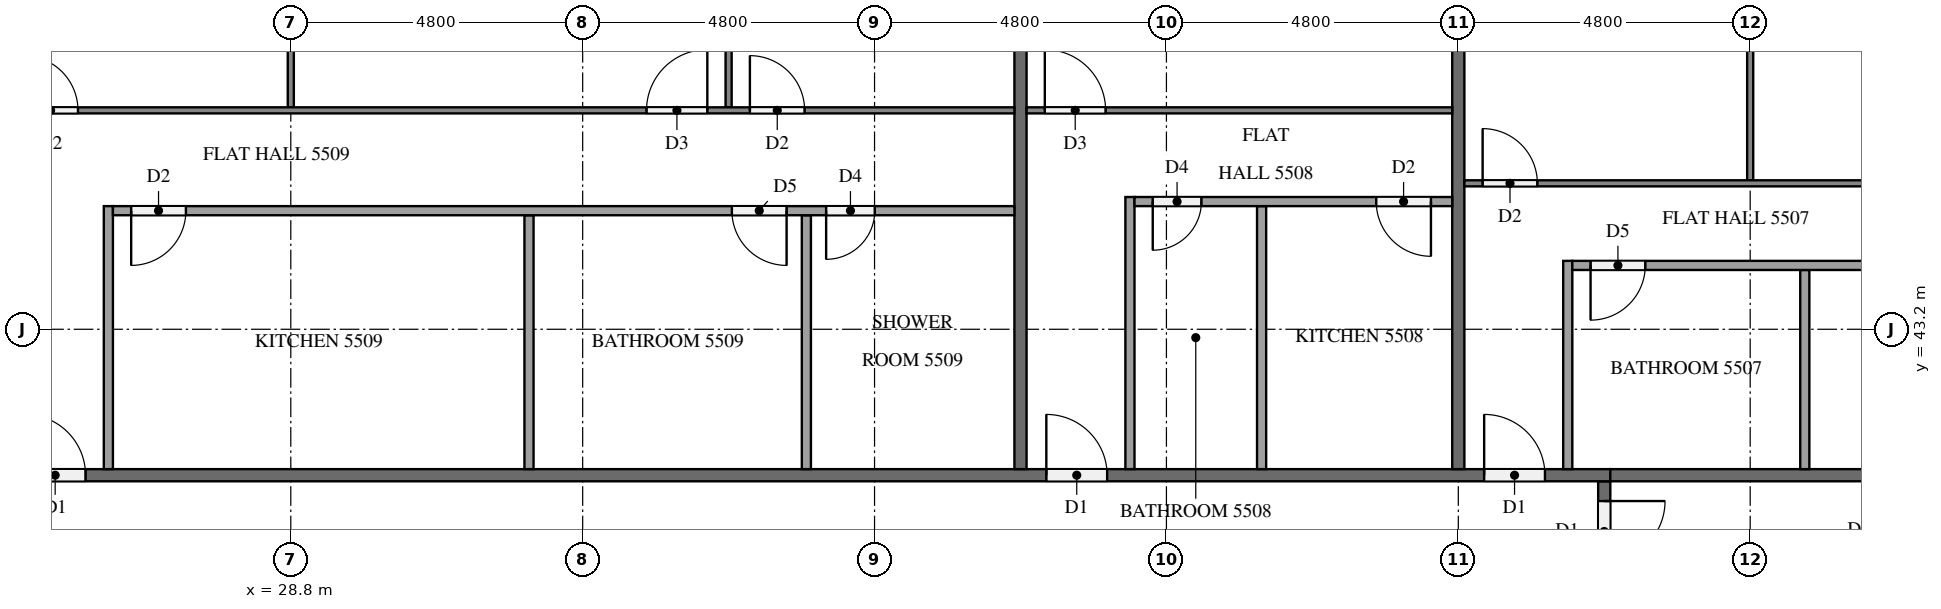
"""IFC4 building model, lengths in metres.
Left out: names, types, materials, properties, quantities, classifications, styles, units other than length and angle.
Written with IfcOpenShell. Run it as: python <this file> out.ifc"""

import sys

from ifc_helpers import new_model, si_unit, direction, frame, frame_2d, origin, place, context, subcontext, project, spatial, rectangle, extrude, element, fill, save


model = new_model("IFC4")
c1 = context("Model", 3, precision=1e-05, world=origin(), true_north=direction((0.0, 1.0)))
c2 = subcontext(c1, "Body", "Model", "MODEL_VIEW")
j1 = project(units=[si_unit("LENGTHUNIT", "METRE"), si_unit("PLANEANGLEUNIT", "RADIAN")], contexts=[c1])
p1 = place(None, origin())
s1 = spatial("IfcSite", under=j1, at=p1, CompositionType="ELEMENT")
p2 = place(p1, origin())
s2 = spatial("IfcBuilding", under=s1, at=p2, CompositionType="ELEMENT")
p3 = place(p2, frame((0.0, 0.0, 212.3)))
s3 = spatial("IfcBuildingStorey", under=s2, at=p3, CompositionType="ELEMENT", Elevation=212.3)
p4 = place(p3, frame((50.4, 40.7, 0.0), z_axis=(0.0, 0.0, 1.0), x_axis=(0.0, -1.0, 0.0)))
e1 = element("IfcWall", 1, at=p4, inside=s3, PredefinedType="PARTITIONING", context=c2, shape_type="SweptSolid", body=[
    extrude(rectangle(XDim=28.6, YDim=0.2, at=frame_2d((14.3, 0.0))), origin(), (0.0, 0.0, 1.0), 3.2),
])
p5 = place(p4, frame((19.525, 0.0, 0.0)))
e2 = element("IfcOpeningElement", 2, at=p5, cuts=e1, PredefinedType="OPENING", context=c2, shape_type="SweptSolid", body=[
    extrude(rectangle(XDim=1.0, YDim=2.1, at=frame_2d((0.5, 1.05))), frame((0.0, 0.11, 0.0), z_axis=(0.0, -1.0, 0.0), x_axis=(1.0, 0.0, 0.0)), (0.0, 0.0, 1.0), 0.22),
])
p6 = place(p4, frame((7.525, 0.0, 0.0)))
e3 = element("IfcOpeningElement", 3, at=p6, cuts=e1, PredefinedType="OPENING", context=c2, shape_type="SweptSolid", body=[
    extrude(rectangle(XDim=1.0, YDim=2.1, at=frame_2d((0.5, 1.05))), frame((0.0, 0.11, 0.0), z_axis=(0.0, -1.0, 0.0), x_axis=(1.0, 0.0, 0.0)), (0.0, 0.0, 1.0), 0.22),
])
p7 = place(p4, frame((0.325, 0.0, 0.0)))
e4 = element("IfcOpeningElement", 4, at=p7, cuts=e1, PredefinedType="OPENING", context=c2, shape_type="SweptSolid", body=[
    extrude(rectangle(XDim=1.0, YDim=2.1, at=frame_2d((0.5, 1.05))), frame((0.0, 0.11, 0.0), z_axis=(0.0, -1.0, 0.0), x_axis=(1.0, 0.0, 0.0)), (0.0, 0.0, 1.0), 0.22),
])
p8 = place(p3, frame((11.9, 40.8, 0.0), z_axis=(0.0, 0.0, 1.0), x_axis=(1.0, 0.0, 0.0)))
e5 = element("IfcWall", 5, at=p8, inside=s3, PredefinedType="PARTITIONING", context=c2, shape_type="SweptSolid", body=[
    extrude(rectangle(XDim=38.6, YDim=0.2, at=frame_2d((19.3, 0.0))), origin(), (0.0, 0.0, 1.0), 3.2),
])
p9 = place(p8, frame((36.525, 0.0, 0.0)))
e6 = element("IfcOpeningElement", 6, at=p9, cuts=e5, PredefinedType="OPENING", context=c2, shape_type="SweptSolid", body=[
    extrude(rectangle(XDim=1.0, YDim=2.1, at=frame_2d((0.5, 1.05))), frame((0.0, 0.11, 0.0), z_axis=(0.0, -1.0, 0.0), x_axis=(1.0, 0.0, 0.0)), (0.0, 0.0, 1.0), 0.22),
])
p10 = place(p8, frame((29.325, 0.0, 0.0)))
e7 = element("IfcOpeningElement", 7, at=p10, cuts=e5, PredefinedType="OPENING", context=c2, shape_type="SweptSolid", body=[
    extrude(rectangle(XDim=1.0, YDim=2.1, at=frame_2d((0.5, 1.05))), frame((0.0, 0.11, 0.0), z_axis=(0.0, -1.0, 0.0), x_axis=(1.0, 0.0, 0.0)), (0.0, 0.0, 1.0), 0.22),
])
p11 = place(p8, frame((12.525, 0.0, 0.0)))
e8 = element("IfcOpeningElement", 8, at=p11, cuts=e5, PredefinedType="OPENING", context=c2, shape_type="SweptSolid", body=[
    extrude(rectangle(XDim=1.0, YDim=2.1, at=frame_2d((0.5, 1.05))), frame((0.0, 0.11, 0.0), z_axis=(0.0, -1.0, 0.0), x_axis=(1.0, 0.0, 0.0)), (0.0, 0.0, 1.0), 0.22),
])
p12 = place(p8, frame((10.625, 0.0, 0.0)))
e9 = element("IfcOpeningElement", 9, at=p12, cuts=e5, PredefinedType="OPENING", context=c2, shape_type="SweptSolid", body=[
    extrude(rectangle(XDim=1.1, YDim=2.1, at=frame_2d((0.55, 1.05))), frame((0.0, 0.11, 0.0), z_axis=(0.0, -1.0, 0.0), x_axis=(1.0, 0.0, 0.0)), (0.0, 0.0, 1.0), 0.22),
])
p13 = place(p3, frame((50.5, 40.8, 0.0), z_axis=(0.0, 0.0, 1.0), x_axis=(1.0, 0.0, 0.0)))
e10 = element("IfcWall", 10, at=p13, inside=s3, PredefinedType="PARTITIONING", context=c2, shape_type="SweptSolid", body=[
    extrude(rectangle(XDim=11.8, YDim=0.2, at=frame_2d((5.9, 0.0))), origin(), (0.0, 0.0, 1.0), 3.2),
])
p14 = place(p3, frame((48.0, 52.475, 0.0), z_axis=(0.0, 0.0, 1.0), x_axis=(0.0, -1.0, 0.0)))
e11 = element("IfcWall", 11, at=p14, inside=s3, PredefinedType="PARTITIONING", context=c2, shape_type="SweptSolid", body=[
    extrude(rectangle(XDim=11.575, YDim=0.2, at=frame_2d((5.788, 0.0))), origin(), (0.0, 0.0, 1.0), 3.2),
])
p15 = place(p3, frame((40.8, 52.7, 0.0), z_axis=(0.0, 0.0, 1.0), x_axis=(0.0, -1.0, 0.0)))
e12 = element("IfcWall", 12, at=p15, inside=s3, PredefinedType="PARTITIONING", context=c2, shape_type="SweptSolid", body=[
    extrude(rectangle(XDim=11.8, YDim=0.2, at=frame_2d((5.9, 0.0))), origin(), (0.0, 0.0, 1.0), 3.2),
])
p16 = place(p3, frame((52.8, 45.65, 0.0), z_axis=(0.0, 0.0, 1.0), x_axis=(0.0, 1.0, 0.0)))
e13 = element("IfcWall", 13, at=p16, inside=s3, PredefinedType="PARTITIONING", context=c2, shape_type="SweptSolid", body=[
    extrude(rectangle(XDim=7.05, YDim=0.1, at=frame_2d((3.525, 0.0))), origin(), (0.0, 0.0, 1.0), 3.2),
])
p17 = place(p3, frame((48.1, 45.6, 0.0), z_axis=(0.0, 0.0, 1.0), x_axis=(1.0, 0.0, 0.0)))
e14 = element("IfcWall", 14, at=p17, inside=s3, PredefinedType="PARTITIONING", context=c2, shape_type="SweptSolid", body=[
    extrude(rectangle(XDim=14.2, YDim=0.1, at=frame_2d((7.1, 0.0))), origin(), (0.0, 0.0, 1.0), 3.2),
])
p18 = place(p17, frame((0.3, 0.0, 0.0)))
e15 = element("IfcOpeningElement", 15, at=p18, cuts=e14, PredefinedType="OPENING", context=c2, shape_type="SweptSolid", body=[
    extrude(rectangle(XDim=0.9, YDim=2.1, at=frame_2d((0.45, 1.05))), frame((0.0, 0.06, 0.0), z_axis=(0.0, -1.0, 0.0), x_axis=(1.0, 0.0, 0.0)), (0.0, 0.0, 1.0), 0.12),
])
p19 = place(p17, frame((8.25, 0.0, 0.0)))
e16 = element("IfcOpeningElement", 16, at=p19, cuts=e14, PredefinedType="OPENING", context=c2, shape_type="SweptSolid", body=[
    extrude(rectangle(XDim=0.9, YDim=2.1, at=frame_2d((0.45, 1.05))), frame((0.0, 0.06, 0.0), z_axis=(0.0, -1.0, 0.0), x_axis=(1.0, 0.0, 0.0)), (0.0, 0.0, 1.0), 0.12),
])
p20 = place(p17, frame((9.85, 0.0, 0.0)))
e17 = element("IfcOpeningElement", 17, at=p20, cuts=e14, PredefinedType="OPENING", context=c2, shape_type="SweptSolid", body=[
    extrude(rectangle(XDim=1.0, YDim=2.1, at=frame_2d((0.5, 1.05))), frame((0.0, 0.06, 0.0), z_axis=(0.0, -1.0, 0.0), x_axis=(1.0, 0.0, 0.0)), (0.0, 0.0, 1.0), 0.12),
])
p21 = place(p3, frame((53.698, 40.9, 0.0), z_axis=(0.0, 0.0, 1.0), x_axis=(0.0, 1.0, 0.0)))
e18 = element("IfcWall", 18, at=p21, inside=s3, PredefinedType="PARTITIONING", context=c2, shape_type="SweptSolid", body=[
    extrude(rectangle(XDim=3.275, YDim=0.15, at=frame_2d((1.638, 0.0))), origin(), (0.0, 0.0, 1.0), 3.2),
])
p22 = place(p3, frame((49.8, 40.9, 0.0), z_axis=(0.0, 0.0, 1.0), x_axis=(0.0, 1.0, 0.0)))
e19 = element("IfcWall", 19, at=p22, inside=s3, PredefinedType="PARTITIONING", context=c2, shape_type="SweptSolid", body=[
    extrude(rectangle(XDim=3.425, YDim=0.15, at=frame_2d((1.712, 0.0))), origin(), (0.0, 0.0, 1.0), 3.2),
])
p23 = place(p3, frame((62.3, 44.25, 0.0), z_axis=(0.0, 0.0, 1.0), x_axis=(-1.0, 0.0, 0.0)))
e20 = element("IfcWall", 20, at=p23, inside=s3, PredefinedType="PARTITIONING", context=c2, shape_type="SweptSolid", body=[
    extrude(rectangle(XDim=12.425, YDim=0.15, at=frame_2d((6.212, 0.0))), origin(), (0.0, 0.0, 1.0), 3.2),
])
p24 = place(p23, frame((11.225, 0.0, 0.0)))
e21 = element("IfcOpeningElement", 21, at=p24, cuts=e20, PredefinedType="OPENING", context=c2, shape_type="SweptSolid", body=[
    extrude(rectangle(XDim=0.9, YDim=2.1, at=frame_2d((0.45, 1.05))), frame((0.0, 0.085, 0.0), z_axis=(0.0, -1.0, 0.0), x_axis=(1.0, 0.0, 0.0)), (0.0, 0.0, 1.0), 0.17),
])
p25 = place(p23, frame((3.192, 0.0, 0.0)))
e22 = element("IfcOpeningElement", 22, at=p25, cuts=e20, PredefinedType="OPENING", context=c2, shape_type="SweptSolid", body=[
    extrude(rectangle(XDim=0.9, YDim=2.1, at=frame_2d((0.45, 1.05))), frame((0.0, 0.085, 0.0), z_axis=(0.0, -1.0, 0.0), x_axis=(1.0, 0.0, 0.0)), (0.0, 0.0, 1.0), 0.17),
])
p26 = place(p23, frame((1.742, 0.0, 0.0)))
e23 = element("IfcOpeningElement", 23, at=p26, cuts=e20, PredefinedType="OPENING", context=c2, shape_type="SweptSolid", body=[
    extrude(rectangle(XDim=0.8, YDim=2.1, at=frame_2d((0.4, 1.05))), frame((0.0, 0.085, 0.0), z_axis=(0.0, -1.0, 0.0), x_axis=(1.0, 0.0, 0.0)), (0.0, 0.0, 1.0), 0.17),
])
p27 = place(p3, frame((40.9, 46.8, 0.0), z_axis=(0.0, 0.0, 1.0), x_axis=(1.0, 0.0, 0.0)))
e24 = element("IfcWall", 24, at=p27, inside=s3, PredefinedType="PARTITIONING", context=c2, shape_type="SweptSolid", body=[
    extrude(rectangle(XDim=7.0, YDim=0.1, at=frame_2d((3.5, 0.0))), origin(), (0.0, 0.0, 1.0), 3.2),
])
p28 = place(p27, frame((0.3, 0.0, 0.0)))
e25 = element("IfcOpeningElement", 25, at=p28, cuts=e24, PredefinedType="OPENING", context=c2, shape_type="SweptSolid", body=[
    extrude(rectangle(XDim=1.0, YDim=2.1, at=frame_2d((0.5, 1.05))), frame((0.0, 0.06, 0.0), z_axis=(0.0, -1.0, 0.0), x_axis=(1.0, 0.0, 0.0)), (0.0, 0.0, 1.0), 0.12),
])
p29 = place(p3, frame((44.765, 40.9, 0.0), z_axis=(0.0, 0.0, 1.0), x_axis=(0.0, 1.0, 0.0)))
e26 = element("IfcWall", 26, at=p29, inside=s3, PredefinedType="PARTITIONING", context=c2, shape_type="SweptSolid", body=[
    extrude(rectangle(XDim=4.325, YDim=0.15, at=frame_2d((2.163, 0.0))), origin(), (0.0, 0.0, 1.0), 3.2),
])
p30 = place(p3, frame((42.6, 40.9, 0.0), z_axis=(0.0, 0.0, 1.0), x_axis=(0.0, 1.0, 0.0)))
e27 = element("IfcWall", 27, at=p30, inside=s3, PredefinedType="PARTITIONING", context=c2, shape_type="SweptSolid", body=[
    extrude(rectangle(XDim=4.475, YDim=0.15, at=frame_2d((2.238, 0.0))), origin(), (0.0, 0.0, 1.0), 3.2),
])
p31 = place(p3, frame((47.9, 45.3, 0.0), z_axis=(0.0, 0.0, 1.0), x_axis=(-1.0, 0.0, 0.0)))
e28 = element("IfcWall", 28, at=p31, inside=s3, PredefinedType="PARTITIONING", context=c2, shape_type="SweptSolid", body=[
    extrude(rectangle(XDim=5.225, YDim=0.15, at=frame_2d((2.612, 0.0))), origin(), (0.0, 0.0, 1.0), 3.2),
])
p32 = place(p31, frame((4.125, 0.0, 0.0)))
e29 = element("IfcOpeningElement", 29, at=p32, cuts=e28, PredefinedType="OPENING", context=c2, shape_type="SweptSolid", body=[
    extrude(rectangle(XDim=0.8, YDim=2.1, at=frame_2d((0.4, 1.05))), frame((0.0, 0.085, 0.0), z_axis=(0.0, -1.0, 0.0), x_axis=(1.0, 0.0, 0.0)), (0.0, 0.0, 1.0), 0.17),
])
p33 = place(p31, frame((0.35, 0.0, 0.0)))
e30 = element("IfcOpeningElement", 30, at=p33, cuts=e28, PredefinedType="OPENING", context=c2, shape_type="SweptSolid", body=[
    extrude(rectangle(XDim=0.9, YDim=2.1, at=frame_2d((0.45, 1.05))), frame((0.0, 0.085, 0.0), z_axis=(0.0, -1.0, 0.0), x_axis=(1.0, 0.0, 0.0)), (0.0, 0.0, 1.0), 0.17),
])
p34 = place(p3, frame((28.8, 46.85, 0.0), z_axis=(0.0, 0.0, 1.0), x_axis=(0.0, 1.0, 0.0)))
e31 = element("IfcWall", 31, at=p34, inside=s3, PredefinedType="PARTITIONING", context=c2, shape_type="SweptSolid", body=[
    extrude(rectangle(XDim=5.625, YDim=0.1, at=frame_2d((2.812, 0.0))), origin(), (0.0, 0.0, 1.0), 3.2),
])
p35 = place(p3, frame((36.0, 46.85, 0.0), z_axis=(0.0, 0.0, 1.0), x_axis=(0.0, 1.0, 0.0)))
e32 = element("IfcWall", 32, at=p35, inside=s3, PredefinedType="PARTITIONING", context=c2, shape_type="SweptSolid", body=[
    extrude(rectangle(XDim=5.85, YDim=0.1, at=frame_2d((2.925, 0.0))), origin(), (0.0, 0.0, 1.0), 3.2),
])
p36 = place(p3, frame((24.1, 46.8, 0.0), z_axis=(0.0, 0.0, 1.0), x_axis=(1.0, 0.0, 0.0)))
e33 = element("IfcWall", 33, at=p36, inside=s3, PredefinedType="PARTITIONING", context=c2, shape_type="SweptSolid", body=[
    extrude(rectangle(XDim=16.6, YDim=0.1, at=frame_2d((8.3, 0.0))), origin(), (0.0, 0.0, 1.0), 3.2),
])
p37 = place(p36, frame((0.3, 0.0, 0.0)))
e34 = element("IfcOpeningElement", 34, at=p37, cuts=e33, PredefinedType="OPENING", context=c2, shape_type="SweptSolid", body=[
    extrude(rectangle(XDim=0.9, YDim=2.1, at=frame_2d((0.45, 1.05))), frame((0.0, 0.06, 0.0), z_axis=(0.0, -1.0, 0.0), x_axis=(1.0, 0.0, 0.0)), (0.0, 0.0, 1.0), 0.12),
])
p38 = place(p36, frame((10.55, 0.0, 0.0)))
e35 = element("IfcOpeningElement", 35, at=p38, cuts=e33, PredefinedType="OPENING", context=c2, shape_type="SweptSolid", body=[
    extrude(rectangle(XDim=1.0, YDim=2.1, at=frame_2d((0.5, 1.05))), frame((0.0, 0.06, 0.0), z_axis=(0.0, -1.0, 0.0), x_axis=(1.0, 0.0, 0.0)), (0.0, 0.0, 1.0), 0.12),
])
p39 = place(p36, frame((12.25, 0.0, 0.0)))
e36 = element("IfcOpeningElement", 36, at=p39, cuts=e33, PredefinedType="OPENING", context=c2, shape_type="SweptSolid", body=[
    extrude(rectangle(XDim=0.9, YDim=2.1, at=frame_2d((0.45, 1.05))), frame((0.0, 0.06, 0.0), z_axis=(0.0, -1.0, 0.0), x_axis=(1.0, 0.0, 0.0)), (0.0, 0.0, 1.0), 0.12),
])
for number, where, z_axis, x_axis in (
    (37, (32.717, 40.9, 0.0), (0.0, 0.0, 1.0), (0.0, 1.0, 0.0)),
    (38, (37.279, 40.9, 0.0), (0.0, 0.0, 1.0), (0.0, 1.0, 0.0)),
):
    element("IfcWall", number, at=place(p3, frame(where, z_axis=z_axis, x_axis=x_axis)), inside=s3, PredefinedType="PARTITIONING", context=c2, shape_type="SweptSolid", body=[
        extrude(rectangle(XDim=4.175, YDim=0.15, at=frame_2d((2.087, 0.0))), origin(), (0.0, 0.0, 1.0), 3.2),
    ])
p40 = place(p3, frame((25.8, 40.9, 0.0), z_axis=(0.0, 0.0, 1.0), x_axis=(0.0, 1.0, 0.0)))
e39 = element("IfcWall", 39, at=p40, inside=s3, PredefinedType="PARTITIONING", context=c2, shape_type="SweptSolid", body=[
    extrude(rectangle(XDim=4.325, YDim=0.15, at=frame_2d((2.163, 0.0))), origin(), (0.0, 0.0, 1.0), 3.2),
])
p41 = place(p3, frame((40.7, 45.15, 0.0), z_axis=(0.0, 0.0, 1.0), x_axis=(-1.0, 0.0, 0.0)))
e40 = element("IfcWall", 40, at=p41, inside=s3, PredefinedType="PARTITIONING", context=c2, shape_type="SweptSolid", body=[
    extrude(rectangle(XDim=14.825, YDim=0.15, at=frame_2d((7.413, 0.0))), origin(), (0.0, 0.0, 1.0), 3.2),
])
p42 = place(p41, frame((13.625, 0.0, 0.0)))
e41 = element("IfcOpeningElement", 41, at=p42, cuts=e40, PredefinedType="OPENING", context=c2, shape_type="SweptSolid", body=[
    extrude(rectangle(XDim=0.9, YDim=2.1, at=frame_2d((0.45, 1.05))), frame((0.0, 0.085, 0.0), z_axis=(0.0, -1.0, 0.0), x_axis=(1.0, 0.0, 0.0)), (0.0, 0.0, 1.0), 0.17),
])
p43 = place(p41, frame((3.746, 0.0, 0.0)))
e42 = element("IfcOpeningElement", 42, at=p43, cuts=e40, PredefinedType="OPENING", context=c2, shape_type="SweptSolid", body=[
    extrude(rectangle(XDim=0.9, YDim=2.1, at=frame_2d((0.45, 1.05))), frame((0.0, 0.085, 0.0), z_axis=(0.0, -1.0, 0.0), x_axis=(1.0, 0.0, 0.0)), (0.0, 0.0, 1.0), 0.17),
])
p44 = place(p41, frame((2.296, 0.0, 0.0)))
e43 = element("IfcOpeningElement", 43, at=p44, cuts=e40, PredefinedType="OPENING", context=c2, shape_type="SweptSolid", body=[
    extrude(rectangle(XDim=0.8, YDim=2.1, at=frame_2d((0.4, 1.05))), frame((0.0, 0.085, 0.0), z_axis=(0.0, -1.0, 0.0), x_axis=(1.0, 0.0, 0.0)), (0.0, 0.0, 1.0), 0.17),
])
p45 = place(p7, origin())
e44 = element("IfcDoor", 44, at=p45, inside=s3, OperationType="SINGLE_SWING_LEFT", PredefinedType="DOOR", context=c2, shape_type="SweptSolid", body=[
    extrude(rectangle(XDim=1.0, YDim=2.1, at=frame_2d((0.5, 1.05))), frame((0.0, 0.025, 0.0), z_axis=(0.0, -1.0, 0.0), x_axis=(1.0, 0.0, 0.0)), (0.0, 0.0, 1.0), 0.05),
])
fill(e4, e44)
p46 = place(p9, origin())
e45 = element("IfcDoor", 45, at=p46, inside=s3, OperationType="SINGLE_SWING_LEFT", PredefinedType="DOOR", context=c2, shape_type="SweptSolid", body=[
    extrude(rectangle(XDim=1.0, YDim=2.1, at=frame_2d((0.5, 1.05))), frame((0.0, 0.025, 0.0), z_axis=(0.0, -1.0, 0.0), x_axis=(1.0, 0.0, 0.0)), (0.0, 0.0, 1.0), 0.05),
])
fill(e6, e45)
p47 = place(p10, origin())
e46 = element("IfcDoor", 46, at=p47, inside=s3, OperationType="SINGLE_SWING_LEFT", PredefinedType="DOOR", context=c2, shape_type="SweptSolid", body=[
    extrude(rectangle(XDim=1.0, YDim=2.1, at=frame_2d((0.5, 1.05))), frame((0.0, 0.025, 0.0), z_axis=(0.0, -1.0, 0.0), x_axis=(1.0, 0.0, 0.0)), (0.0, 0.0, 1.0), 0.05),
])
fill(e7, e46)
p48 = place(p11, origin())
e47 = element("IfcDoor", 47, at=p48, inside=s3, OperationType="SINGLE_SWING_LEFT", PredefinedType="DOOR", context=c2, shape_type="SweptSolid", body=[
    extrude(rectangle(XDim=1.0, YDim=2.1, at=frame_2d((0.5, 1.05))), frame((0.0, 0.025, 0.0), z_axis=(0.0, -1.0, 0.0), x_axis=(1.0, 0.0, 0.0)), (0.0, 0.0, 1.0), 0.05),
])
fill(e8, e47)
p49 = place(p18, origin())
e48 = element("IfcDoor", 48, at=p49, inside=s3, OperationType="SINGLE_SWING_LEFT", PredefinedType="DOOR", context=c2, shape_type="SweptSolid", body=[
    extrude(rectangle(XDim=0.9, YDim=2.1, at=frame_2d((0.45, 1.05))), frame((0.0, 0.025, 0.0), z_axis=(0.0, -1.0, 0.0), x_axis=(1.0, 0.0, 0.0)), (0.0, 0.0, 1.0), 0.05),
])
fill(e15, e48)
p50 = place(p24, origin())
e49 = element("IfcDoor", 49, at=p50, inside=s3, OperationType="SINGLE_SWING_RIGHT", PredefinedType="DOOR", context=c2, shape_type="SweptSolid", body=[
    extrude(rectangle(XDim=0.9, YDim=2.1, at=frame_2d((0.45, 1.05))), frame((0.0, 0.025, 0.0), z_axis=(0.0, -1.0, 0.0), x_axis=(1.0, 0.0, 0.0)), (0.0, 0.0, 1.0), 0.05),
])
fill(e21, e49)
p51 = place(p28, origin())
e50 = element("IfcDoor", 50, at=p51, inside=s3, OperationType="SINGLE_SWING_LEFT", PredefinedType="DOOR", context=c2, shape_type="SweptSolid", body=[
    extrude(rectangle(XDim=1.0, YDim=2.1, at=frame_2d((0.5, 1.05))), frame((0.0, 0.025, 0.0), z_axis=(0.0, -1.0, 0.0), x_axis=(1.0, 0.0, 0.0)), (0.0, 0.0, 1.0), 0.05),
])
fill(e25, e50)
p52 = place(p32, origin())
e51 = element("IfcDoor", 51, at=p52, inside=s3, OperationType="SINGLE_SWING_RIGHT", PredefinedType="DOOR", context=c2, shape_type="SweptSolid", body=[
    extrude(rectangle(XDim=0.8, YDim=2.1, at=frame_2d((0.4, 1.05))), frame((0.0, 0.025, 0.0), z_axis=(0.0, -1.0, 0.0), x_axis=(1.0, 0.0, 0.0)), (0.0, 0.0, 1.0), 0.05),
])
fill(e29, e51)
p53 = place(p33, origin())
e52 = element("IfcDoor", 52, at=p53, inside=s3, OperationType="SINGLE_SWING_LEFT", PredefinedType="DOOR", context=c2, shape_type="SweptSolid", body=[
    extrude(rectangle(XDim=0.9, YDim=2.1, at=frame_2d((0.45, 1.05))), frame((0.0, 0.025, 0.0), z_axis=(0.0, -1.0, 0.0), x_axis=(1.0, 0.0, 0.0)), (0.0, 0.0, 1.0), 0.05),
])
fill(e30, e52)
p54 = place(p37, origin())
e53 = element("IfcDoor", 53, at=p54, inside=s3, OperationType="SINGLE_SWING_LEFT", PredefinedType="DOOR", context=c2, shape_type="SweptSolid", body=[
    extrude(rectangle(XDim=0.9, YDim=2.1, at=frame_2d((0.45, 1.05))), frame((0.0, 0.025, 0.0), z_axis=(0.0, -1.0, 0.0), x_axis=(1.0, 0.0, 0.0)), (0.0, 0.0, 1.0), 0.05),
])
fill(e34, e53)
p55 = place(p38, origin())
e54 = element("IfcDoor", 54, at=p55, inside=s3, OperationType="SINGLE_SWING_RIGHT", PredefinedType="DOOR", context=c2, shape_type="SweptSolid", body=[
    extrude(rectangle(XDim=1.0, YDim=2.1, at=frame_2d((0.5, 1.05))), frame((0.0, 0.025, 0.0), z_axis=(0.0, -1.0, 0.0), x_axis=(1.0, 0.0, 0.0)), (0.0, 0.0, 1.0), 0.05),
])
fill(e35, e54)
p56 = place(p39, origin())
e55 = element("IfcDoor", 55, at=p56, inside=s3, OperationType="SINGLE_SWING_LEFT", PredefinedType="DOOR", context=c2, shape_type="SweptSolid", body=[
    extrude(rectangle(XDim=0.9, YDim=2.1, at=frame_2d((0.45, 1.05))), frame((0.0, 0.025, 0.0), z_axis=(0.0, -1.0, 0.0), x_axis=(1.0, 0.0, 0.0)), (0.0, 0.0, 1.0), 0.05),
])
fill(e36, e55)
p57 = place(p42, origin())
e56 = element("IfcDoor", 56, at=p57, inside=s3, OperationType="SINGLE_SWING_RIGHT", PredefinedType="DOOR", context=c2, shape_type="SweptSolid", body=[
    extrude(rectangle(XDim=0.9, YDim=2.1, at=frame_2d((0.45, 1.05))), frame((0.0, 0.025, 0.0), z_axis=(0.0, -1.0, 0.0), x_axis=(1.0, 0.0, 0.0)), (0.0, 0.0, 1.0), 0.05),
])
fill(e41, e56)
p58 = place(p43, origin())
e57 = element("IfcDoor", 57, at=p58, inside=s3, OperationType="SINGLE_SWING_LEFT", PredefinedType="DOOR", context=c2, shape_type="SweptSolid", body=[
    extrude(rectangle(XDim=0.9, YDim=2.1, at=frame_2d((0.45, 1.05))), frame((0.0, 0.025, 0.0), z_axis=(0.0, -1.0, 0.0), x_axis=(1.0, 0.0, 0.0)), (0.0, 0.0, 1.0), 0.05),
])
fill(e42, e57)
p59 = place(p44, origin())
e58 = element("IfcDoor", 58, at=p59, inside=s3, OperationType="SINGLE_SWING_RIGHT", PredefinedType="DOOR", context=c2, shape_type="SweptSolid", body=[
    extrude(rectangle(XDim=0.8, YDim=2.1, at=frame_2d((0.4, 1.05))), frame((0.0, 0.025, 0.0), z_axis=(0.0, -1.0, 0.0), x_axis=(1.0, 0.0, 0.0)), (0.0, 0.0, 1.0), 0.05),
])
fill(e43, e58)
save(model, sys.argv[1])
